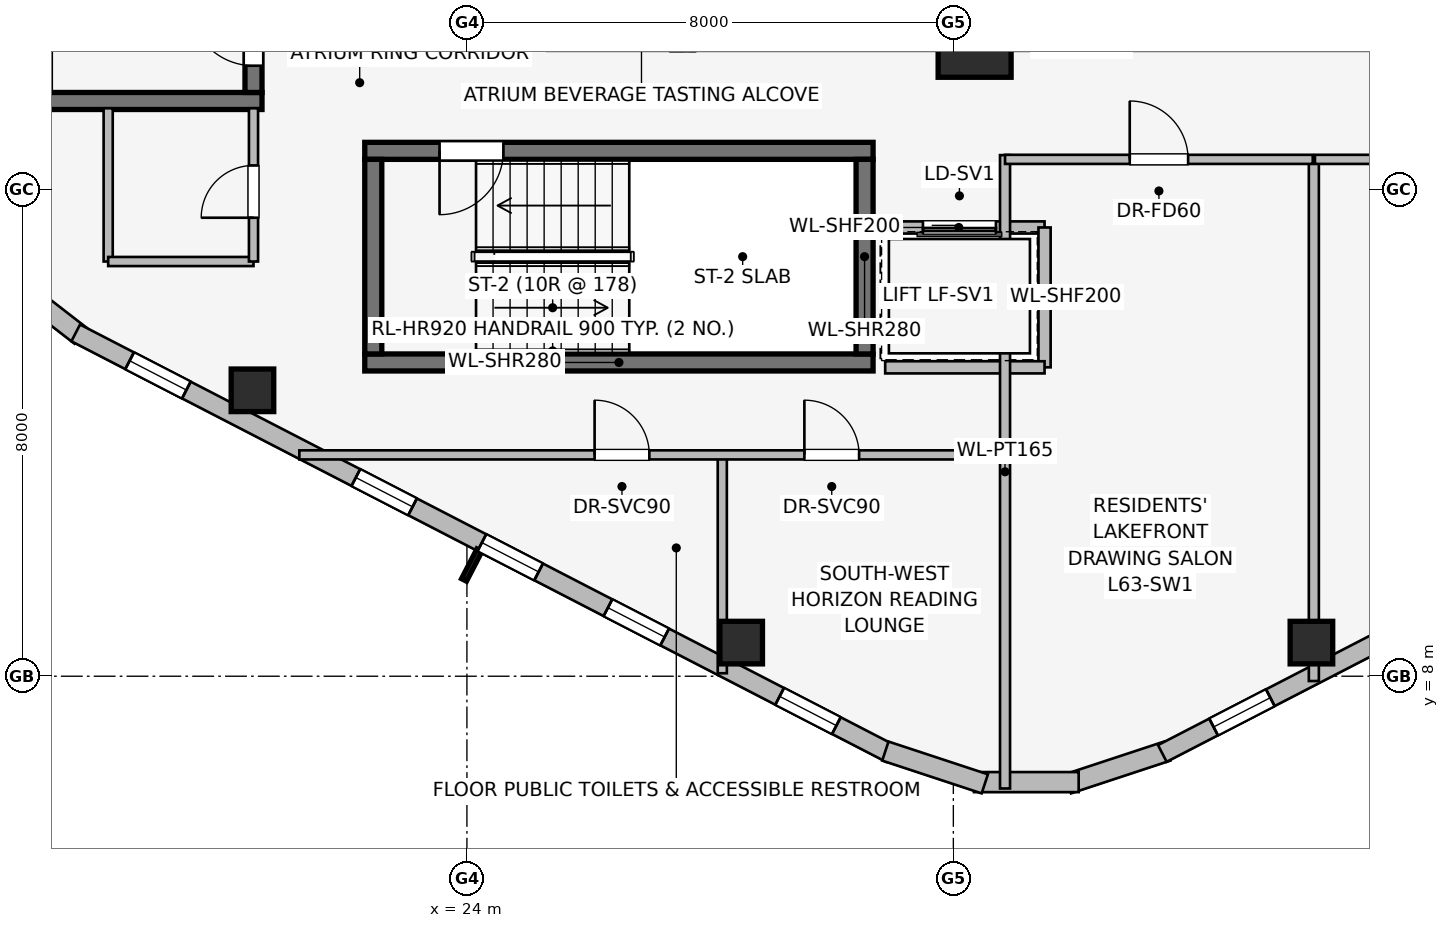
"""IFC4 building model, lengths in metres.
Left out: names, types, materials, properties, quantities, classifications, styles, units other than length and angle.
Written with IfcOpenShell. Run it as: python <this file> out.ifc"""

import sys

from ifc_helpers import new_model, si_unit, direction, frame, frame_2d, origin, origin_2d, place, context, subcontext, project, spatial, rectangle, extrude, element, fill, save


model = new_model("IFC4")
c1 = context("Model", 3, precision=1e-05, world=origin(), true_north=direction((0.0, 1.0)))
c2 = subcontext(c1, "Body", "Model", "MODEL_VIEW")
j1 = project(units=[si_unit("LENGTHUNIT", "METRE"), si_unit("PLANEANGLEUNIT", "RADIAN")], contexts=[c1])
p1 = place(None, origin())
s1 = spatial("IfcSite", under=j1, at=p1, CompositionType="ELEMENT")
p2 = place(p1, origin())
s2 = spatial("IfcBuilding", under=s1, at=p2, CompositionType="ELEMENT")
p3 = place(p2, frame((0.0, 0.0, 231.25)))
s3 = spatial("IfcBuildingStorey", under=s2, at=p3, CompositionType="ELEMENT", Elevation=231.25)
p4 = place(p3, frame((16.87, 17.46, 0.0), z_axis=(0.0, 0.0, 1.0), x_axis=(1.0, 0.0, 0.0)))
e1 = element("IfcWall", 1, at=p4, inside=s3, PredefinedType="SHEAR", context=c2, shape_type="SweptSolid", body=[
    extrude(rectangle(XDim=3.76, YDim=0.28, at=frame_2d((1.88, 0.0))), origin(), (0.0, 0.0, 1.0), 3.55),
])
p5 = place(p3, frame((20.49, 17.6, 0.0), z_axis=(0.0, 0.0, 1.0), x_axis=(0.0, 1.0, 0.0)))
e2 = element("IfcWall", 2, at=p5, inside=s3, PredefinedType="SHEAR", context=c2, shape_type="SweptSolid", body=[
    extrude(rectangle(XDim=7.8, YDim=0.28, at=frame_2d((3.9, 0.0))), origin(), (0.0, 0.0, 1.0), 3.55),
])
p6 = place(p5, frame((0.44, 0.0, 0.0)))
e3 = element("IfcOpeningElement", 3, at=p6, cuts=e2, PredefinedType="OPENING", context=c2, shape_type="SweptSolid", body=[
    extrude(rectangle(XDim=1.05, YDim=2.0, at=frame_2d((0.525, 1.0))), frame((0.0, 0.15, 0.0), z_axis=(0.0, -1.0, 0.0), x_axis=(1.0, 0.0, 0.0)), (0.0, 0.0, 1.0), 0.3),
])
p7 = place(p3, frame((22.32, 13.16, 0.0), z_axis=(0.0, 0.0, 1.0), x_axis=(1.0, 0.0, 0.0)))
e4 = element("IfcWall", 4, at=p7, inside=s3, PredefinedType="SHEAR", context=c2, shape_type="SweptSolid", body=[
    extrude(rectangle(XDim=8.36, YDim=0.28, at=frame_2d((4.18, 0.0))), origin(), (0.0, 0.0, 1.0), 3.55),
])
p8 = place(p3, frame((30.68, 16.64, 0.0), z_axis=(0.0, 0.0, 1.0), x_axis=(-1.0, 0.0, 0.0)))
e5 = element("IfcWall", 5, at=p8, inside=s3, PredefinedType="SHEAR", context=c2, shape_type="SweptSolid", body=[
    extrude(rectangle(XDim=8.36, YDim=0.28, at=frame_2d((4.18, 0.0))), origin(), (0.0, 0.0, 1.0), 3.55),
])
p9 = place(p8, frame((6.08, 0.0, 0.0)))
e6 = element("IfcOpeningElement", 6, at=p9, cuts=e5, PredefinedType="OPENING", context=c2, shape_type="SweptSolid", body=[
    extrude(rectangle(XDim=1.05, YDim=2.0, at=frame_2d((0.525, 1.0))), frame((0.0, 0.15, 0.0), z_axis=(0.0, -1.0, 0.0), x_axis=(1.0, 0.0, 0.0)), (0.0, 0.0, 1.0), 0.3),
])
for number, where, z_axis, x_axis in (
    (7, (22.46, 16.5, 0.0), (0.0, 0.0, 1.0), (0.0, -1.0, 0.0)),
    (8, (30.54, 13.3, 0.0), (0.0, 0.0, 1.0), (0.0, 1.0, 0.0)),
):
    element("IfcWall", number, at=place(p3, frame(where, z_axis=z_axis, x_axis=x_axis)), inside=s3, PredefinedType="SHEAR", context=c2, shape_type="SweptSolid", body=[
        extrude(rectangle(XDim=3.2, YDim=0.28, at=frame_2d((1.6, 0.0))), origin(), (0.0, 0.0, 1.0), 3.55),
    ])
p10 = place(p3, frame((32.35, 18.45, 0.0), z_axis=(0.0, 0.0, 1.0), x_axis=(1.0, 0.0, 0.0)))
e9 = element("IfcColumn", 9, at=p10, inside=s3, PredefinedType="COLUMN", context=c2, shape_type="SweptSolid", body=[
    extrude(rectangle(XDim=1.2, YDim=1.2, at=origin_2d()), origin(), (0.0, 0.0, 1.0), 3.55),
])
for number, where, z_axis, x_axis in (
    (10, (20.473, 12.702, 0.0), (0.0, 0.0, 1.0), (1.0, 0.0, 0.0)),
    (11, (28.511, 8.553, 0.0), (0.0, 0.0, 1.0), (1.0, 0.0, 0.0)),
    (12, (37.889, 8.553, 0.0), (0.0, 0.0, 1.0), (1.0, 0.0, 0.0)),
):
    element("IfcColumn", number, at=place(p3, frame(where, z_axis=z_axis, x_axis=x_axis)), inside=s3, PredefinedType="COLUMN", context=c2, shape_type="SweptSolid", body=[
        extrude(rectangle(XDim=0.7, YDim=0.7, at=origin_2d()), origin(), (0.0, 0.0, 1.0), 3.55),
    ])
p11 = place(p3, frame((17.647, 13.599, 0.0), z_axis=(0.0, 0.0, 1.0), x_axis=(-0.790691856293, 0.61221433207, 0.0)))
e13 = element("IfcWall", 13, at=p11, inside=s3, PredefinedType="STANDARD", context=c2, shape_type="SweptSolid", body=[
    extrude(rectangle(XDim=1.676, YDim=0.33, at=frame_2d((0.838, 0.0))), origin(), (0.0, 0.0, 1.0), 3.26),
])
p12 = place(p3, frame((30.963, 6.73, 0.0), z_axis=(0.0, 0.0, 1.0), x_axis=(-0.888581481622, 0.458718814218, 0.0)))
e14 = element("IfcWall", 14, at=p12, inside=s3, PredefinedType="STANDARD", context=c2, shape_type="SweptSolid", body=[
    extrude(rectangle(XDim=15.077, YDim=0.31, at=frame_2d((7.539, 0.0))), origin(), (0.0, 0.0, 1.0), 3.26),
])
p13 = place(p12, frame((0.998, 0.0, 0.75)))
e15 = element("IfcOpeningElement", 15, at=p13, cuts=e14, PredefinedType="OPENING", context=c2, shape_type="SweptSolid", body=[
    extrude(rectangle(XDim=1.05, YDim=1.4, at=frame_2d((0.525, 0.7))), frame((0.0, 0.165, 0.0), z_axis=(0.0, -1.0, 0.0), x_axis=(1.0, 0.0, 0.0)), (0.0, 0.0, 1.0), 0.33),
])
p14 = place(p12, frame((4.176, 0.0, 0.75)))
e16 = element("IfcOpeningElement", 16, at=p14, cuts=e14, PredefinedType="OPENING", context=c2, shape_type="SweptSolid", body=[
    extrude(rectangle(XDim=1.05, YDim=1.4, at=frame_2d((0.525, 0.7))), frame((0.0, 0.165, 0.0), z_axis=(0.0, -1.0, 0.0), x_axis=(1.0, 0.0, 0.0)), (0.0, 0.0, 1.0), 0.33),
])
p15 = place(p12, frame((6.509, 0.0, 0.75)))
e17 = element("IfcOpeningElement", 17, at=p15, cuts=e14, PredefinedType="OPENING", context=c2, shape_type="SweptSolid", body=[
    extrude(rectangle(XDim=1.05, YDim=1.4, at=frame_2d((0.525, 0.7))), frame((0.0, 0.165, 0.0), z_axis=(0.0, -1.0, 0.0), x_axis=(1.0, 0.0, 0.0)), (0.0, 0.0, 1.0), 0.33),
])
p16 = place(p12, frame((8.842, 0.0, 0.75)))
e18 = element("IfcOpeningElement", 18, at=p16, cuts=e14, PredefinedType="OPENING", context=c2, shape_type="SweptSolid", body=[
    extrude(rectangle(XDim=1.05, YDim=1.4, at=frame_2d((0.525, 0.7))), frame((0.0, 0.165, 0.0), z_axis=(0.0, -1.0, 0.0), x_axis=(1.0, 0.0, 0.0)), (0.0, 0.0, 1.0), 0.33),
])
p17 = place(p12, frame((13.029, 0.0, 0.75)))
e19 = element("IfcOpeningElement", 19, at=p17, cuts=e14, PredefinedType="OPENING", context=c2, shape_type="SweptSolid", body=[
    extrude(rectangle(XDim=1.05, YDim=1.4, at=frame_2d((0.525, 0.7))), frame((0.0, 0.165, 0.0), z_axis=(0.0, -1.0, 0.0), x_axis=(1.0, 0.0, 0.0)), (0.0, 0.0, 1.0), 0.33),
])
p18 = place(p3, frame((35.518, 6.769, 0.0), z_axis=(0.0, 0.0, 1.0), x_axis=(-0.949713440491, -0.313120393699, 0.0)))
e20 = element("IfcWall", 20, at=p18, inside=s3, PredefinedType="STANDARD", context=c2, shape_type="SweptSolid", body=[
    extrude(rectangle(XDim=1.722, YDim=0.33, at=frame_2d((0.861, 0.0))), origin(), (0.0, 0.0, 1.0), 3.26),
])
p19 = place(p3, frame((34.061, 6.259, 0.0), z_axis=(0.0, 0.0, 1.0), x_axis=(-1.0, 0.0, 0.0)))
e21 = element("IfcWall", 21, at=p19, inside=s3, PredefinedType="STANDARD", context=c2, shape_type="SweptSolid", body=[
    extrude(rectangle(XDim=1.722, YDim=0.33, at=frame_2d((0.861, 0.0))), origin(), (0.0, 0.0, 1.0), 3.26),
])
p20 = place(p3, frame((32.517, 6.23, 0.0), z_axis=(0.0, 0.0, 1.0), x_axis=(-0.949713440491, 0.313120393699, 0.0)))
e22 = element("IfcWall", 22, at=p20, inside=s3, PredefinedType="STANDARD", context=c2, shape_type="SweptSolid", body=[
    extrude(rectangle(XDim=1.722, YDim=0.33, at=frame_2d((0.861, 0.0))), origin(), (0.0, 0.0, 1.0), 3.26),
])
p21 = place(p3, frame((48.834, 13.646, 0.0), z_axis=(0.0, 0.0, 1.0), x_axis=(-0.888581481622, -0.458718814218, 0.0)))
e23 = element("IfcWall", 23, at=p21, inside=s3, PredefinedType="STANDARD", context=c2, shape_type="SweptSolid", body=[
    extrude(rectangle(XDim=15.077, YDim=0.31, at=frame_2d((7.539, 0.0))), origin(), (0.0, 0.0, 1.0), 3.26),
])
p22 = place(p21, frame((0.962, 0.0, 0.75)))
e24 = element("IfcOpeningElement", 24, at=p22, cuts=e23, PredefinedType="OPENING", context=c2, shape_type="SweptSolid", body=[
    extrude(rectangle(XDim=1.05, YDim=1.4, at=frame_2d((0.525, 0.7))), frame((0.0, 0.165, 0.0), z_axis=(0.0, -1.0, 0.0), x_axis=(1.0, 0.0, 0.0)), (0.0, 0.0, 1.0), 0.33),
])
p23 = place(p21, frame((4.393, 0.0, 0.75)))
e25 = element("IfcOpeningElement", 25, at=p23, cuts=e23, PredefinedType="OPENING", context=c2, shape_type="SweptSolid", body=[
    extrude(rectangle(XDim=1.05, YDim=1.4, at=frame_2d((0.525, 0.7))), frame((0.0, 0.165, 0.0), z_axis=(0.0, -1.0, 0.0), x_axis=(1.0, 0.0, 0.0)), (0.0, 0.0, 1.0), 0.33),
])
p24 = place(p21, frame((7.014, 0.0, 0.75)))
e26 = element("IfcOpeningElement", 26, at=p24, cuts=e23, PredefinedType="OPENING", context=c2, shape_type="SweptSolid", body=[
    extrude(rectangle(XDim=1.05, YDim=1.4, at=frame_2d((0.525, 0.7))), frame((0.0, 0.165, 0.0), z_axis=(0.0, -1.0, 0.0), x_axis=(1.0, 0.0, 0.0)), (0.0, 0.0, 1.0), 0.33),
])
p25 = place(p21, frame((9.635, 0.0, 0.75)))
e27 = element("IfcOpeningElement", 27, at=p25, cuts=e23, PredefinedType="OPENING", context=c2, shape_type="SweptSolid", body=[
    extrude(rectangle(XDim=1.05, YDim=1.4, at=frame_2d((0.525, 0.7))), frame((0.0, 0.165, 0.0), z_axis=(0.0, -1.0, 0.0), x_axis=(1.0, 0.0, 0.0)), (0.0, 0.0, 1.0), 0.33),
])
p26 = place(p21, frame((13.078, 0.0, 0.75)))
e28 = element("IfcOpeningElement", 28, at=p26, cuts=e23, PredefinedType="OPENING", context=c2, shape_type="SweptSolid", body=[
    extrude(rectangle(XDim=1.05, YDim=1.4, at=frame_2d((0.525, 0.7))), frame((0.0, 0.165, 0.0), z_axis=(0.0, -1.0, 0.0), x_axis=(1.0, 0.0, 0.0)), (0.0, 0.0, 1.0), 0.33),
])
p27 = place(p3, frame((33.5, 15.38, 0.0), z_axis=(0.0, 0.0, 1.0), x_axis=(-1.0, 0.0, 0.0)))
e29 = element("IfcWall", 29, at=p27, inside=s3, PredefinedType="PARTITIONING", context=c2, shape_type="SweptSolid", body=[
    extrude(rectangle(XDim=2.82, YDim=0.2, at=frame_2d((1.41, 0.0))), origin(), (0.0, 0.0, 1.0), 3.26),
])
p28 = place(p27, frame((0.8, 0.0, 0.0)))
e30 = element("IfcOpeningElement", 30, at=p28, cuts=e29, PredefinedType="OPENING", context=c2, shape_type="SweptSolid", body=[
    extrude(rectangle(XDim=1.2, YDim=2.2, at=frame_2d((0.6, 1.1))), frame((0.0, 0.11, 0.0), z_axis=(0.0, -1.0, 0.0), x_axis=(1.0, 0.0, 0.0)), (0.0, 0.0, 1.0), 0.22),
])
p29 = place(p3, frame((33.5, 13.08, 0.0), z_axis=(0.0, 0.0, 1.0), x_axis=(0.0, 1.0, 0.0)))
e31 = element("IfcWall", 31, at=p29, inside=s3, PredefinedType="PARTITIONING", context=c2, shape_type="SweptSolid", body=[
    extrude(rectangle(XDim=2.3, YDim=0.2, at=frame_2d((1.15, 0.0))), origin(), (0.0, 0.0, 1.0), 3.26),
])
p30 = place(p3, frame((30.879, 13.08, 0.0), z_axis=(0.0, 0.0, 1.0), x_axis=(1.0, 0.0, 0.0)))
e32 = element("IfcWall", 32, at=p30, inside=s3, PredefinedType="PARTITIONING", context=c2, shape_type="SweptSolid", body=[
    extrude(rectangle(XDim=2.621, YDim=0.2, at=frame_2d((1.311, 0.0))), origin(), (0.0, 0.0, 1.0), 3.26),
])
p31 = place(p3, frame((18.1, 17.34, 0.0), z_axis=(0.0, 0.0, 1.0), x_axis=(0.0, -1.0, 0.0)))
e33 = element("IfcWall", 33, at=p31, inside=s3, PredefinedType="PARTITIONING", context=c2, shape_type="SweptSolid", body=[
    extrude(rectangle(XDim=2.52, YDim=0.15, at=frame_2d((1.26, 0.0))), origin(), (0.0, 0.0, 1.0), 3.26),
])
p32 = place(p3, frame((18.1, 14.82, 0.0), z_axis=(0.0, 0.0, 1.0), x_axis=(1.0, 0.0, 0.0)))
e34 = element("IfcWall", 34, at=p32, inside=s3, PredefinedType="PARTITIONING", context=c2, shape_type="SweptSolid", body=[
    extrude(rectangle(XDim=2.39, YDim=0.15, at=frame_2d((1.195, 0.0))), origin(), (0.0, 0.0, 1.0), 3.26),
])
p33 = place(p3, frame((20.49, 14.82, 0.0), z_axis=(0.0, 0.0, 1.0), x_axis=(0.0, 1.0, 0.0)))
e35 = element("IfcWall", 35, at=p33, inside=s3, PredefinedType="PARTITIONING", context=c2, shape_type="SweptSolid", body=[
    extrude(rectangle(XDim=2.52, YDim=0.15, at=frame_2d((1.26, 0.0))), origin(), (0.0, 0.0, 1.0), 3.26),
])
p34 = place(p33, frame((0.72, 0.0, 0.0)))
e36 = element("IfcOpeningElement", 36, at=p34, cuts=e35, PredefinedType="OPENING", context=c2, shape_type="SweptSolid", body=[
    extrude(rectangle(XDim=0.86, YDim=2.0, at=frame_2d((0.43, 1.0))), frame((0.0, 0.085, 0.0), z_axis=(0.0, -1.0, 0.0), x_axis=(1.0, 0.0, 0.0)), (0.0, 0.0, 1.0), 0.17),
])
p35 = place(p3, frame((32.85, 6.154, 0.0), z_axis=(0.0, 0.0, 1.0), x_axis=(0.0, 1.0, 0.0)))
e37 = element("IfcWall", 37, at=p35, inside=s3, PredefinedType="PARTITIONING", context=c2, shape_type="SweptSolid", body=[
    extrude(rectangle(XDim=10.416, YDim=0.165, at=frame_2d((5.208, 0.0))), origin(), (0.0, 0.0, 1.0), 3.26),
])
p36 = place(p3, frame((28.2, 8.049, 0.0), z_axis=(0.0, 0.0, 1.0), x_axis=(0.0, 1.0, 0.0)))
e38 = element("IfcWall", 38, at=p36, inside=s3, PredefinedType="PARTITIONING", context=c2, shape_type="SweptSolid", body=[
    extrude(rectangle(XDim=3.591, YDim=0.15, at=frame_2d((1.795, 0.0))), origin(), (0.0, 0.0, 1.0), 3.26),
])
p37 = place(p3, frame((21.244, 11.64, 0.0), z_axis=(0.0, 0.0, 1.0), x_axis=(1.0, 0.0, 0.0)))
e39 = element("IfcWall", 39, at=p37, inside=s3, PredefinedType="PARTITIONING", context=c2, shape_type="SweptSolid", body=[
    extrude(rectangle(XDim=11.606, YDim=0.15, at=frame_2d((5.803, 0.0))), origin(), (0.0, 0.0, 1.0), 3.26),
])
p38 = place(p37, frame((4.856, 0.0, 0.0)))
e40 = element("IfcOpeningElement", 40, at=p38, cuts=e39, PredefinedType="OPENING", context=c2, shape_type="SweptSolid", body=[
    extrude(rectangle(XDim=0.9, YDim=2.0, at=frame_2d((0.45, 1.0))), frame((0.0, 0.085, 0.0), z_axis=(0.0, -1.0, 0.0), x_axis=(1.0, 0.0, 0.0)), (0.0, 0.0, 1.0), 0.17),
])
p39 = place(p37, frame((8.306, 0.0, 0.0)))
e41 = element("IfcOpeningElement", 41, at=p39, cuts=e39, PredefinedType="OPENING", context=c2, shape_type="SweptSolid", body=[
    extrude(rectangle(XDim=0.9, YDim=2.0, at=frame_2d((0.45, 1.0))), frame((0.0, 0.085, 0.0), z_axis=(0.0, -1.0, 0.0), x_axis=(1.0, 0.0, 0.0)), (0.0, 0.0, 1.0), 0.17),
])
p40 = place(p3, frame((37.929, 7.921, 0.0), z_axis=(0.0, 0.0, 1.0), x_axis=(0.0, 1.0, 0.0)))
e42 = element("IfcWall", 42, at=p40, inside=s3, PredefinedType="PARTITIONING", context=c2, shape_type="SweptSolid", body=[
    extrude(rectangle(XDim=8.549, YDim=0.165, at=frame_2d((4.274, 0.0))), origin(), (0.0, 0.0, 1.0), 3.26),
])
p41 = place(p3, frame((32.85, 16.5, 0.0), z_axis=(0.0, 0.0, 1.0), x_axis=(1.0, 0.0, 0.0)))
e43 = element("IfcWall", 43, at=p41, inside=s3, PredefinedType="PARTITIONING", context=c2, shape_type="SweptSolid", body=[
    extrude(rectangle(XDim=5.061, YDim=0.15, at=frame_2d((2.53, 0.0))), origin(), (0.0, 0.0, 1.0), 3.26),
])
p42 = place(p41, frame((2.051, 0.0, 0.0)))
e44 = element("IfcOpeningElement", 44, at=p42, cuts=e43, PredefinedType="OPENING", context=c2, shape_type="SweptSolid", body=[
    extrude(rectangle(XDim=0.96, YDim=2.0, at=frame_2d((0.48, 1.0))), frame((0.0, 0.085, 0.0), z_axis=(0.0, -1.0, 0.0), x_axis=(1.0, 0.0, 0.0)), (0.0, 0.0, 1.0), 0.17),
])
p43 = place(p3, frame((37.947, 16.5, 0.0), z_axis=(0.0, 0.0, 1.0), x_axis=(1.0, 0.0, 0.0)))
e45 = element("IfcWall", 45, at=p43, inside=s3, PredefinedType="PARTITIONING", context=c2, shape_type="SweptSolid", body=[
    extrude(rectangle(XDim=3.513, YDim=0.15, at=frame_2d((1.756, 0.0))), origin(), (0.0, 0.0, 1.0), 3.26),
])
p44 = place(p43, frame((1.277, 0.0, 0.0)))
e46 = element("IfcOpeningElement", 46, at=p44, cuts=e45, PredefinedType="OPENING", context=c2, shape_type="SweptSolid", body=[
    extrude(rectangle(XDim=0.96, YDim=2.0, at=frame_2d((0.48, 1.0))), frame((0.0, 0.085, 0.0), z_axis=(0.0, -1.0, 0.0), x_axis=(1.0, 0.0, 0.0)), (0.0, 0.0, 1.0), 0.17),
])
p45 = place(p13, origin())
e47 = element("IfcWindow", 47, at=p45, inside=s3, PartitioningType="SINGLE_PANEL", PredefinedType="WINDOW", context=c2, shape_type="SweptSolid", body=[
    extrude(rectangle(XDim=1.05, YDim=1.4, at=frame_2d((0.525, 0.7))), frame((0.0, 0.03, 0.0), z_axis=(0.0, -1.0, 0.0), x_axis=(1.0, 0.0, 0.0)), (0.0, 0.0, 1.0), 0.06),
])
fill(e15, e47)
p46 = place(p14, origin())
e48 = element("IfcWindow", 48, at=p46, inside=s3, PartitioningType="SINGLE_PANEL", PredefinedType="WINDOW", context=c2, shape_type="SweptSolid", body=[
    extrude(rectangle(XDim=1.05, YDim=1.4, at=frame_2d((0.525, 0.7))), frame((0.0, 0.03, 0.0), z_axis=(0.0, -1.0, 0.0), x_axis=(1.0, 0.0, 0.0)), (0.0, 0.0, 1.0), 0.06),
])
fill(e16, e48)
p47 = place(p15, origin())
e49 = element("IfcWindow", 49, at=p47, inside=s3, PartitioningType="SINGLE_PANEL", PredefinedType="WINDOW", context=c2, shape_type="SweptSolid", body=[
    extrude(rectangle(XDim=1.05, YDim=1.4, at=frame_2d((0.525, 0.7))), frame((0.0, 0.03, 0.0), z_axis=(0.0, -1.0, 0.0), x_axis=(1.0, 0.0, 0.0)), (0.0, 0.0, 1.0), 0.06),
])
fill(e17, e49)
p48 = place(p16, origin())
e50 = element("IfcWindow", 50, at=p48, inside=s3, PartitioningType="SINGLE_PANEL", PredefinedType="WINDOW", context=c2, shape_type="SweptSolid", body=[
    extrude(rectangle(XDim=1.05, YDim=1.4, at=frame_2d((0.525, 0.7))), frame((0.0, 0.03, 0.0), z_axis=(0.0, -1.0, 0.0), x_axis=(1.0, 0.0, 0.0)), (0.0, 0.0, 1.0), 0.06),
])
fill(e18, e50)
p49 = place(p17, origin())
e51 = element("IfcWindow", 51, at=p49, inside=s3, PartitioningType="SINGLE_PANEL", PredefinedType="WINDOW", context=c2, shape_type="SweptSolid", body=[
    extrude(rectangle(XDim=1.05, YDim=1.4, at=frame_2d((0.525, 0.7))), frame((0.0, 0.03, 0.0), z_axis=(0.0, -1.0, 0.0), x_axis=(1.0, 0.0, 0.0)), (0.0, 0.0, 1.0), 0.06),
])
fill(e19, e51)
p50 = place(p26, origin())
e52 = element("IfcWindow", 52, at=p50, inside=s3, PartitioningType="SINGLE_PANEL", PredefinedType="WINDOW", context=c2, shape_type="SweptSolid", body=[
    extrude(rectangle(XDim=1.05, YDim=1.4, at=frame_2d((0.525, 0.7))), frame((0.0, 0.03, 0.0), z_axis=(0.0, -1.0, 0.0), x_axis=(1.0, 0.0, 0.0)), (0.0, 0.0, 1.0), 0.06),
])
fill(e28, e52)
p51 = place(p6, origin())
e53 = element("IfcDoor", 53, at=p51, inside=s3, OperationType="SINGLE_SWING_RIGHT", PredefinedType="DOOR", context=c2, shape_type="SweptSolid", body=[
    extrude(rectangle(XDim=1.05, YDim=2.0, at=frame_2d((0.525, 1.0))), frame((0.0, 0.025, 0.0), z_axis=(0.0, -1.0, 0.0), x_axis=(1.0, 0.0, 0.0)), (0.0, 0.0, 1.0), 0.05),
])
fill(e3, e53)
p52 = place(p9, origin())
e54 = element("IfcDoor", 54, at=p52, inside=s3, OperationType="SINGLE_SWING_RIGHT", PredefinedType="DOOR", context=c2, shape_type="SweptSolid", body=[
    extrude(rectangle(XDim=1.05, YDim=2.0, at=frame_2d((0.525, 1.0))), frame((0.0, 0.025, 0.0), z_axis=(0.0, -1.0, 0.0), x_axis=(1.0, 0.0, 0.0)), (0.0, 0.0, 1.0), 0.05),
])
fill(e6, e54)
p53 = place(p28, origin())
e55 = element("IfcDoor", 55, at=p53, inside=s3, OperationType="SLIDING_TO_RIGHT", PredefinedType="DOOR", context=c2, shape_type="SweptSolid", body=[
    extrude(rectangle(XDim=1.2, YDim=2.2, at=frame_2d((0.6, 1.1))), frame((0.0, 0.025, 0.0), z_axis=(0.0, -1.0, 0.0), x_axis=(1.0, 0.0, 0.0)), (0.0, 0.0, 1.0), 0.05),
])
fill(e30, e55)
p54 = place(p34, origin())
e56 = element("IfcDoor", 56, at=p54, inside=s3, OperationType="SINGLE_SWING_LEFT", PredefinedType="DOOR", context=c2, shape_type="SweptSolid", body=[
    extrude(rectangle(XDim=0.86, YDim=2.0, at=frame_2d((0.43, 1.0))), frame((0.0, 0.025, 0.0), z_axis=(0.0, -1.0, 0.0), x_axis=(1.0, 0.0, 0.0)), (0.0, 0.0, 1.0), 0.05),
])
fill(e36, e56)
p55 = place(p38, origin())
e57 = element("IfcDoor", 57, at=p55, inside=s3, OperationType="SINGLE_SWING_LEFT", PredefinedType="DOOR", context=c2, shape_type="SweptSolid", body=[
    extrude(rectangle(XDim=0.9, YDim=2.0, at=frame_2d((0.45, 1.0))), frame((0.0, 0.025, 0.0), z_axis=(0.0, -1.0, 0.0), x_axis=(1.0, 0.0, 0.0)), (0.0, 0.0, 1.0), 0.05),
])
fill(e40, e57)
p56 = place(p39, origin())
e58 = element("IfcDoor", 58, at=p56, inside=s3, OperationType="SINGLE_SWING_LEFT", PredefinedType="DOOR", context=c2, shape_type="SweptSolid", body=[
    extrude(rectangle(XDim=0.9, YDim=2.0, at=frame_2d((0.45, 1.0))), frame((0.0, 0.025, 0.0), z_axis=(0.0, -1.0, 0.0), x_axis=(1.0, 0.0, 0.0)), (0.0, 0.0, 1.0), 0.05),
])
fill(e41, e58)
p57 = place(p42, origin())
e59 = element("IfcDoor", 59, at=p57, inside=s3, OperationType="SINGLE_SWING_LEFT", PredefinedType="DOOR", context=c2, shape_type="SweptSolid", body=[
    extrude(rectangle(XDim=0.96, YDim=2.0, at=frame_2d((0.48, 1.0))), frame((0.0, 0.025, 0.0), z_axis=(0.0, -1.0, 0.0), x_axis=(1.0, 0.0, 0.0)), (0.0, 0.0, 1.0), 0.05),
])
fill(e44, e59)
save(model, sys.argv[1])
